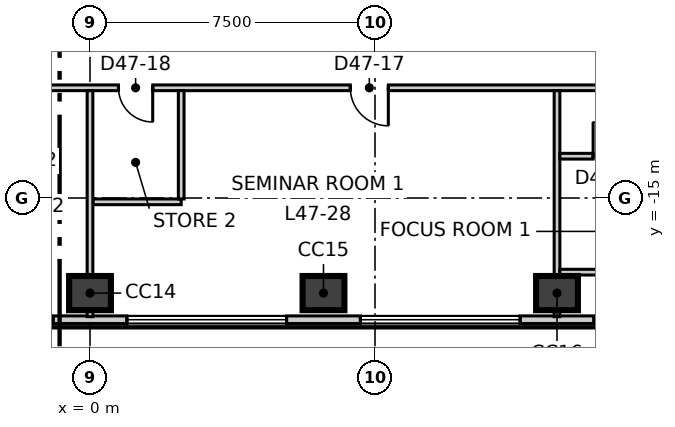
"""IFC4 building model, lengths in metres.
Left out: names, types, materials, properties, quantities, classifications, styles, units other than length and angle.
Written with IfcOpenShell. Run it as: python <this file> out.ifc"""

import sys

from ifc_helpers import new_model, si_unit, direction, frame, frame_2d, origin, origin_2d, place, context, subcontext, project, spatial, rectangle, extrude, element, fill, save


model = new_model("IFC4")
c1 = context("Model", 3, precision=1e-05, world=origin(), true_north=direction((0.0, 1.0)))
c2 = subcontext(c1, "Body", "Model", "MODEL_VIEW")
j1 = project(units=[si_unit("LENGTHUNIT", "METRE"), si_unit("PLANEANGLEUNIT", "RADIAN")], contexts=[c1])
p1 = place(None, origin())
s1 = spatial("IfcSite", under=j1, at=p1, CompositionType="ELEMENT")
p2 = place(p1, origin())
s2 = spatial("IfcBuilding", under=s1, at=p2, CompositionType="ELEMENT")
p3 = place(p2, frame((0.0, 0.0, 203.3)))
s3 = spatial("IfcBuildingStorey", under=s2, at=p3, CompositionType="ELEMENT", Elevation=203.3)
for number, where, z_axis, x_axis in (
    (1, (0.0, -17.502, -0.3), (0.0, 0.0, 1.0), (1.0, 0.0, 0.0)),
    (2, (6.144, -17.502, -0.3), (0.0, 0.0, 1.0), (1.0, 0.0, 0.0)),
    (3, (12.289, -17.502, -0.3), (0.0, 0.0, 1.0), (1.0, 0.0, 0.0)),
):
    element("IfcColumn", number, at=place(p3, frame(where, z_axis=z_axis, x_axis=x_axis)), inside=s3, PredefinedType="COLUMN", context=c2, shape_type="SweptSolid", body=[
        extrude(rectangle(XDim=1.1, YDim=0.9, at=origin_2d()), origin(), (0.0, 0.0, 1.0), 4.0),
    ])
p4 = place(p3, frame((-25.88, -18.202, 0.0), z_axis=(0.0, 0.0, 1.0), x_axis=(1.0, 0.0, 0.0)))
e4 = element("IfcWall", 4, at=p4, inside=s3, PredefinedType="ELEMENTEDWALL", context=c2, shape_type="SweptSolid", body=[
    extrude(rectangle(XDim=51.74, YDim=0.2, at=frame_2d((25.87, 0.0))), origin(), (0.0, 0.0, 1.0), 3.7),
])
p5 = place(p4, frame((2.275, 0.0, 0.9)))
e5 = element("IfcOpeningElement", 5, at=p5, cuts=e4, PredefinedType="OPENING", context=c2, shape_type="SweptSolid", body=[
    extrude(rectangle(XDim=4.2, YDim=2.5, at=frame_2d((2.1, 1.25))), frame((0.0, 0.11, 0.0), z_axis=(0.0, -1.0, 0.0), x_axis=(1.0, 0.0, 0.0)), (0.0, 0.0, 1.0), 0.22),
])
p6 = place(p4, frame((8.419, 0.0, 0.9)))
e6 = element("IfcOpeningElement", 6, at=p6, cuts=e4, PredefinedType="OPENING", context=c2, shape_type="SweptSolid", body=[
    extrude(rectangle(XDim=4.2, YDim=2.5, at=frame_2d((2.1, 1.25))), frame((0.0, 0.11, 0.0), z_axis=(0.0, -1.0, 0.0), x_axis=(1.0, 0.0, 0.0)), (0.0, 0.0, 1.0), 0.22),
])
p7 = place(p4, frame((14.564, 0.0, 0.9)))
e7 = element("IfcOpeningElement", 7, at=p7, cuts=e4, PredefinedType="OPENING", context=c2, shape_type="SweptSolid", body=[
    extrude(rectangle(XDim=4.2, YDim=2.5, at=frame_2d((2.1, 1.25))), frame((0.0, 0.11, 0.0), z_axis=(0.0, -1.0, 0.0), x_axis=(1.0, 0.0, 0.0)), (0.0, 0.0, 1.0), 0.22),
])
p8 = place(p4, frame((20.708, 0.0, 0.9)))
e8 = element("IfcOpeningElement", 8, at=p8, cuts=e4, PredefinedType="OPENING", context=c2, shape_type="SweptSolid", body=[
    extrude(rectangle(XDim=4.2, YDim=2.5, at=frame_2d((2.1, 1.25))), frame((0.0, 0.11, 0.0), z_axis=(0.0, -1.0, 0.0), x_axis=(1.0, 0.0, 0.0)), (0.0, 0.0, 1.0), 0.22),
])
p9 = place(p4, frame((26.852, 0.0, 0.9)))
e9 = element("IfcOpeningElement", 9, at=p9, cuts=e4, PredefinedType="OPENING", context=c2, shape_type="SweptSolid", body=[
    extrude(rectangle(XDim=4.2, YDim=2.5, at=frame_2d((2.1, 1.25))), frame((0.0, 0.11, 0.0), z_axis=(0.0, -1.0, 0.0), x_axis=(1.0, 0.0, 0.0)), (0.0, 0.0, 1.0), 0.22),
])
p10 = place(p4, frame((32.996, 0.0, 0.9)))
e10 = element("IfcOpeningElement", 10, at=p10, cuts=e4, PredefinedType="OPENING", context=c2, shape_type="SweptSolid", body=[
    extrude(rectangle(XDim=4.2, YDim=2.5, at=frame_2d((2.1, 1.25))), frame((0.0, 0.11, 0.0), z_axis=(0.0, -1.0, 0.0), x_axis=(1.0, 0.0, 0.0)), (0.0, 0.0, 1.0), 0.22),
])
p11 = place(p4, frame((39.141, 0.0, 0.9)))
e11 = element("IfcOpeningElement", 11, at=p11, cuts=e4, PredefinedType="OPENING", context=c2, shape_type="SweptSolid", body=[
    extrude(rectangle(XDim=4.2, YDim=2.5, at=frame_2d((2.1, 1.25))), frame((0.0, 0.11, 0.0), z_axis=(0.0, -1.0, 0.0), x_axis=(1.0, 0.0, 0.0)), (0.0, 0.0, 1.0), 0.22),
])
p12 = place(p4, frame((45.285, 0.0, 0.9)))
e12 = element("IfcOpeningElement", 12, at=p12, cuts=e4, PredefinedType="OPENING", context=c2, shape_type="SweptSolid", body=[
    extrude(rectangle(XDim=4.2, YDim=2.5, at=frame_2d((2.1, 1.25))), frame((0.0, 0.11, 0.0), z_axis=(0.0, -1.0, 0.0), x_axis=(1.0, 0.0, 0.0)), (0.0, 0.0, 1.0), 0.22),
])
p13 = place(p3, frame((28.704, -13.311, 0.0), z_axis=(0.0, 0.0, 1.0), x_axis=(-0.500010281129, 0.866019467891, 0.0)))
e13 = element("IfcWall", 13, at=p13, inside=s3, PredefinedType="ELEMENTEDWALL", context=c2, shape_type="SweptSolid", body=[
    extrude(rectangle(XDim=51.739, YDim=0.2, at=frame_2d((25.87, 0.0))), origin(), (0.0, 0.0, 1.0), 3.7),
])
p14 = place(p13, frame((2.275, 0.0, 0.9)))
e14 = element("IfcOpeningElement", 14, at=p14, cuts=e13, PredefinedType="OPENING", context=c2, shape_type="SweptSolid", body=[
    extrude(rectangle(XDim=4.2, YDim=2.5, at=frame_2d((2.1, 1.25))), frame((0.0, 0.11, 0.0), z_axis=(0.0, -1.0, 0.0), x_axis=(1.0, 0.0, 0.0)), (0.0, 0.0, 1.0), 0.22),
])
p15 = place(p13, frame((8.419, 0.0, 0.9)))
e15 = element("IfcOpeningElement", 15, at=p15, cuts=e13, PredefinedType="OPENING", context=c2, shape_type="SweptSolid", body=[
    extrude(rectangle(XDim=4.2, YDim=2.5, at=frame_2d((2.1, 1.25))), frame((0.0, 0.11, 0.0), z_axis=(0.0, -1.0, 0.0), x_axis=(1.0, 0.0, 0.0)), (0.0, 0.0, 1.0), 0.22),
])
p16 = place(p13, frame((14.563, 0.0, 0.9)))
e16 = element("IfcOpeningElement", 16, at=p16, cuts=e13, PredefinedType="OPENING", context=c2, shape_type="SweptSolid", body=[
    extrude(rectangle(XDim=4.2, YDim=2.5, at=frame_2d((2.1, 1.25))), frame((0.0, 0.11, 0.0), z_axis=(0.0, -1.0, 0.0), x_axis=(1.0, 0.0, 0.0)), (0.0, 0.0, 1.0), 0.22),
])
p17 = place(p13, frame((20.707, 0.0, 0.9)))
e17 = element("IfcOpeningElement", 17, at=p17, cuts=e13, PredefinedType="OPENING", context=c2, shape_type="SweptSolid", body=[
    extrude(rectangle(XDim=4.2, YDim=2.5, at=frame_2d((2.1, 1.25))), frame((0.0, 0.11, 0.0), z_axis=(0.0, -1.0, 0.0), x_axis=(1.0, 0.0, 0.0)), (0.0, 0.0, 1.0), 0.22),
])
p18 = place(p13, frame((26.852, 0.0, 0.9)))
e18 = element("IfcOpeningElement", 18, at=p18, cuts=e13, PredefinedType="OPENING", context=c2, shape_type="SweptSolid", body=[
    extrude(rectangle(XDim=4.2, YDim=2.5, at=frame_2d((2.1, 1.25))), frame((0.0, 0.11, 0.0), z_axis=(0.0, -1.0, 0.0), x_axis=(1.0, 0.0, 0.0)), (0.0, 0.0, 1.0), 0.22),
])
p19 = place(p13, frame((32.996, 0.0, 0.9)))
e19 = element("IfcOpeningElement", 19, at=p19, cuts=e13, PredefinedType="OPENING", context=c2, shape_type="SweptSolid", body=[
    extrude(rectangle(XDim=4.2, YDim=2.5, at=frame_2d((2.1, 1.25))), frame((0.0, 0.11, 0.0), z_axis=(0.0, -1.0, 0.0), x_axis=(1.0, 0.0, 0.0)), (0.0, 0.0, 1.0), 0.22),
])
p20 = place(p13, frame((39.14, 0.0, 0.9)))
e20 = element("IfcOpeningElement", 20, at=p20, cuts=e13, PredefinedType="OPENING", context=c2, shape_type="SweptSolid", body=[
    extrude(rectangle(XDim=4.2, YDim=2.5, at=frame_2d((2.1, 1.25))), frame((0.0, 0.11, 0.0), z_axis=(0.0, -1.0, 0.0), x_axis=(1.0, 0.0, 0.0)), (0.0, 0.0, 1.0), 0.22),
])
p21 = place(p13, frame((45.284, 0.0, 0.9)))
e21 = element("IfcOpeningElement", 21, at=p21, cuts=e13, PredefinedType="OPENING", context=c2, shape_type="SweptSolid", body=[
    extrude(rectangle(XDim=4.2, YDim=2.5, at=frame_2d((2.1, 1.25))), frame((0.0, 0.11, 0.0), z_axis=(0.0, -1.0, 0.0), x_axis=(1.0, 0.0, 0.0)), (0.0, 0.0, 1.0), 0.22),
])
p22 = place(p3, frame((-20.883, -11.97, 0.0), z_axis=(0.0, 0.0, 1.0), x_axis=(0.500006150555, 0.866021852731, 0.0)))
e22 = element("IfcWall", 22, at=p22, inside=s3, PredefinedType="PARTITIONING", context=c2, shape_type="SweptSolid", body=[
    extrude(rectangle(XDim=41.766, YDim=0.15, at=frame_2d((20.883, 0.0))), origin(), (0.0, 0.0, 1.0), 3.7),
])
p23 = place(p22, frame((36.916, 0.0, 0.0)))
e23 = element("IfcOpeningElement", 23, at=p23, cuts=e22, PredefinedType="OPENING", context=c2, shape_type="SweptSolid", body=[
    extrude(rectangle(XDim=1.1, YDim=2.1, at=frame_2d((0.55, 1.05))), frame((0.0, 0.085, 0.0), z_axis=(0.0, -1.0, 0.0), x_axis=(1.0, 0.0, 0.0)), (0.0, 0.0, 1.0), 0.17),
])
p24 = place(p22, frame((26.446, 0.0, 0.0)))
e24 = element("IfcOpeningElement", 24, at=p24, cuts=e22, PredefinedType="OPENING", context=c2, shape_type="SweptSolid", body=[
    extrude(rectangle(XDim=1.1, YDim=2.1, at=frame_2d((0.55, 1.05))), frame((0.0, 0.085, 0.0), z_axis=(0.0, -1.0, 0.0), x_axis=(1.0, 0.0, 0.0)), (0.0, 0.0, 1.0), 0.17),
])
p25 = place(p22, frame((9.757, 0.0, 0.0)))
e25 = element("IfcOpeningElement", 25, at=p25, cuts=e22, PredefinedType="OPENING", context=c2, shape_type="SweptSolid", body=[
    extrude(rectangle(XDim=1.1, YDim=2.1, at=frame_2d((0.55, 1.05))), frame((0.0, 0.085, 0.0), z_axis=(0.0, -1.0, 0.0), x_axis=(1.0, 0.0, 0.0)), (0.0, 0.0, 1.0), 0.17),
])
p26 = place(p22, frame((18.757, 0.0, 0.0)))
e26 = element("IfcOpeningElement", 26, at=p26, cuts=e22, PredefinedType="OPENING", context=c2, shape_type="SweptSolid", body=[
    extrude(rectangle(XDim=0.9, YDim=2.1, at=frame_2d((0.45, 1.05))), frame((0.0, 0.085, 0.0), z_axis=(0.0, -1.0, 0.0), x_axis=(1.0, 0.0, 0.0)), (0.0, 0.0, 1.0), 0.17),
])
p27 = place(p22, frame((15.557, 0.0, 0.0)))
e27 = element("IfcOpeningElement", 27, at=p27, cuts=e22, PredefinedType="OPENING", context=c2, shape_type="SweptSolid", body=[
    extrude(rectangle(XDim=0.9, YDim=2.1, at=frame_2d((0.45, 1.05))), frame((0.0, 0.085, 0.0), z_axis=(0.0, -1.0, 0.0), x_axis=(1.0, 0.0, 0.0)), (0.0, 0.0, 1.0), 0.17),
])
p28 = place(p22, frame((12.657, 0.0, 0.0)))
e28 = element("IfcOpeningElement", 28, at=p28, cuts=e22, PredefinedType="OPENING", context=c2, shape_type="SweptSolid", body=[
    extrude(rectangle(XDim=1.0, YDim=2.1, at=frame_2d((0.5, 1.05))), frame((0.0, 0.085, 0.0), z_axis=(0.0, -1.0, 0.0), x_axis=(1.0, 0.0, 0.0)), (0.0, 0.0, 1.0), 0.17),
])
p29 = place(p22, frame((3.669, 0.0, 0.0)))
e29 = element("IfcOpeningElement", 29, at=p29, cuts=e22, PredefinedType="OPENING", context=c2, shape_type="SweptSolid", body=[
    extrude(rectangle(XDim=1.1, YDim=2.1, at=frame_2d((0.55, 1.05))), frame((0.0, 0.085, 0.0), z_axis=(0.0, -1.0, 0.0), x_axis=(1.0, 0.0, 0.0)), (0.0, 0.0, 1.0), 0.17),
])
p30 = place(p3, frame((-20.808, -12.1, 0.0), z_axis=(0.0, 0.0, 1.0), x_axis=(1.0, 0.0, 0.0)))
e30 = element("IfcWall", 30, at=p30, inside=s3, PredefinedType="PARTITIONING", context=c2, shape_type="SweptSolid", body=[
    extrude(rectangle(XDim=41.766, YDim=0.15, at=frame_2d((20.883, 0.0))), origin(), (0.0, 0.0, 1.0), 3.7),
])
p31 = place(p30, frame((3.6, 0.0, 0.0)))
e31 = element("IfcOpeningElement", 31, at=p31, cuts=e30, PredefinedType="OPENING", context=c2, shape_type="SweptSolid", body=[
    extrude(rectangle(XDim=1.1, YDim=2.1, at=frame_2d((0.55, 1.05))), frame((0.0, 0.085, 0.0), z_axis=(0.0, -1.0, 0.0), x_axis=(1.0, 0.0, 0.0)), (0.0, 0.0, 1.0), 0.17),
])
p32 = place(p30, frame((17.07, 0.0, 0.0)))
e32 = element("IfcOpeningElement", 32, at=p32, cuts=e30, PredefinedType="OPENING", context=c2, shape_type="SweptSolid", body=[
    extrude(rectangle(XDim=1.1, YDim=2.1, at=frame_2d((0.55, 1.05))), frame((0.0, 0.085, 0.0), z_axis=(0.0, -1.0, 0.0), x_axis=(1.0, 0.0, 0.0)), (0.0, 0.0, 1.0), 0.17),
])
p33 = place(p30, frame((9.87, 0.0, 0.0)))
e33 = element("IfcOpeningElement", 33, at=p33, cuts=e30, PredefinedType="OPENING", context=c2, shape_type="SweptSolid", body=[
    extrude(rectangle(XDim=0.9, YDim=2.1, at=frame_2d((0.45, 1.05))), frame((0.0, 0.085, 0.0), z_axis=(0.0, -1.0, 0.0), x_axis=(1.0, 0.0, 0.0)), (0.0, 0.0, 1.0), 0.17),
])
p34 = place(p30, frame((12.87, 0.0, 0.0)))
e34 = element("IfcOpeningElement", 34, at=p34, cuts=e30, PredefinedType="OPENING", context=c2, shape_type="SweptSolid", body=[
    extrude(rectangle(XDim=0.9, YDim=2.1, at=frame_2d((0.45, 1.05))), frame((0.0, 0.085, 0.0), z_axis=(0.0, -1.0, 0.0), x_axis=(1.0, 0.0, 0.0)), (0.0, 0.0, 1.0), 0.17),
])
p35 = place(p30, frame((27.658, 0.0, 0.0)))
e35 = element("IfcOpeningElement", 35, at=p35, cuts=e30, PredefinedType="OPENING", context=c2, shape_type="SweptSolid", body=[
    extrude(rectangle(XDim=1.0, YDim=2.1, at=frame_2d((0.5, 1.05))), frame((0.0, 0.085, 0.0), z_axis=(0.0, -1.0, 0.0), x_axis=(1.0, 0.0, 0.0)), (0.0, 0.0, 1.0), 0.17),
])
p36 = place(p30, frame((21.558, 0.0, 0.0)))
e36 = element("IfcOpeningElement", 36, at=p36, cuts=e30, PredefinedType="OPENING", context=c2, shape_type="SweptSolid", body=[
    extrude(rectangle(XDim=0.9, YDim=2.1, at=frame_2d((0.45, 1.05))), frame((0.0, 0.085, 0.0), z_axis=(0.0, -1.0, 0.0), x_axis=(1.0, 0.0, 0.0)), (0.0, 0.0, 1.0), 0.17),
])
p37 = place(p30, frame((36.847, 0.0, 0.0)))
e37 = element("IfcOpeningElement", 37, at=p37, cuts=e30, PredefinedType="OPENING", context=c2, shape_type="SweptSolid", body=[
    extrude(rectangle(XDim=1.1, YDim=2.1, at=frame_2d((0.55, 1.05))), frame((0.0, 0.085, 0.0), z_axis=(0.0, -1.0, 0.0), x_axis=(1.0, 0.0, 0.0)), (0.0, 0.0, 1.0), 0.17),
])
p38 = place(p3, frame((0.075, -15.1, 0.0), z_axis=(0.0, 0.0, 1.0), x_axis=(1.0, 0.0, 0.0)))
e38 = element("IfcWall", 38, at=p38, inside=s3, PredefinedType="PARTITIONING", context=c2, shape_type="SweptSolid", body=[
    extrude(rectangle(XDim=2.325, YDim=0.15, at=frame_2d((1.163, 0.0))), origin(), (0.0, 0.0, 1.0), 3.7),
])
p39 = place(p3, frame((0.0, -18.122, 0.0), z_axis=(0.0, 0.0, 1.0), x_axis=(0.0, 1.0, 0.0)))
e39 = element("IfcWall", 39, at=p39, inside=s3, PredefinedType="PARTITIONING", context=c2, shape_type="SweptSolid", body=[
    extrude(rectangle(XDim=5.947, YDim=0.15, at=frame_2d((2.974, 0.0))), origin(), (0.0, 0.0, 1.0), 3.2),
])
p40 = place(p3, frame((2.4, -15.025, 0.0), z_axis=(0.0, 0.0, 1.0), x_axis=(0.0, 1.0, 0.0)))
e40 = element("IfcWall", 40, at=p40, inside=s3, PredefinedType="PARTITIONING", context=c2, shape_type="SweptSolid", body=[
    extrude(rectangle(XDim=2.85, YDim=0.15, at=frame_2d((1.425, 0.0))), origin(), (0.0, 0.0, 1.0), 3.7),
])
p41 = place(p3, frame((0.075, 24.07, 0.0), z_axis=(0.0, 0.0, 1.0), x_axis=(0.500006834213, -0.866021458014, 0.0)))
e41 = element("IfcWall", 41, at=p41, inside=s3, PredefinedType="PARTITIONING", context=c2, shape_type="SweptSolid", body=[
    extrude(rectangle(XDim=41.616, YDim=0.15, at=frame_2d((20.808, 0.0))), origin(), (0.0, 0.0, 1.0), 3.7),
])
p42 = place(p41, frame((36.915, 0.0, 0.0)))
e42 = element("IfcOpeningElement", 42, at=p42, cuts=e41, PredefinedType="OPENING", context=c2, shape_type="SweptSolid", body=[
    extrude(rectangle(XDim=1.1, YDim=2.1, at=frame_2d((0.55, 1.05))), frame((0.0, 0.085, 0.0), z_axis=(0.0, -1.0, 0.0), x_axis=(1.0, 0.0, 0.0)), (0.0, 0.0, 1.0), 0.17),
])
p43 = place(p41, frame((22.046, 0.0, 0.0)))
e43 = element("IfcOpeningElement", 43, at=p43, cuts=e41, PredefinedType="OPENING", context=c2, shape_type="SweptSolid", body=[
    extrude(rectangle(XDim=1.1, YDim=2.1, at=frame_2d((0.55, 1.05))), frame((0.0, 0.085, 0.0), z_axis=(0.0, -1.0, 0.0), x_axis=(1.0, 0.0, 0.0)), (0.0, 0.0, 1.0), 0.17),
])
p44 = place(p41, frame((31.046, 0.0, 0.0)))
e44 = element("IfcOpeningElement", 44, at=p44, cuts=e41, PredefinedType="OPENING", context=c2, shape_type="SweptSolid", body=[
    extrude(rectangle(XDim=0.9, YDim=2.1, at=frame_2d((0.45, 1.05))), frame((0.0, 0.085, 0.0), z_axis=(0.0, -1.0, 0.0), x_axis=(1.0, 0.0, 0.0)), (0.0, 0.0, 1.0), 0.17),
])
p45 = place(p41, frame((27.846, 0.0, 0.0)))
e45 = element("IfcOpeningElement", 45, at=p45, cuts=e41, PredefinedType="OPENING", context=c2, shape_type="SweptSolid", body=[
    extrude(rectangle(XDim=0.9, YDim=2.1, at=frame_2d((0.45, 1.05))), frame((0.0, 0.085, 0.0), z_axis=(0.0, -1.0, 0.0), x_axis=(1.0, 0.0, 0.0)), (0.0, 0.0, 1.0), 0.17),
])
p46 = place(p41, frame((24.946, 0.0, 0.0)))
e46 = element("IfcOpeningElement", 46, at=p46, cuts=e41, PredefinedType="OPENING", context=c2, shape_type="SweptSolid", body=[
    extrude(rectangle(XDim=1.0, YDim=2.1, at=frame_2d((0.5, 1.05))), frame((0.0, 0.085, 0.0), z_axis=(0.0, -1.0, 0.0), x_axis=(1.0, 0.0, 0.0)), (0.0, 0.0, 1.0), 0.17),
])
p47 = place(p41, frame((17.258, 0.0, 0.0)))
e47 = element("IfcOpeningElement", 47, at=p47, cuts=e41, PredefinedType="OPENING", context=c2, shape_type="SweptSolid", body=[
    extrude(rectangle(XDim=1.0, YDim=2.1, at=frame_2d((0.5, 1.05))), frame((0.0, 0.085, 0.0), z_axis=(0.0, -1.0, 0.0), x_axis=(1.0, 0.0, 0.0)), (0.0, 0.0, 1.0), 0.17),
])
p48 = place(p41, frame((11.114, 0.0, 0.0)))
e48 = element("IfcOpeningElement", 48, at=p48, cuts=e41, PredefinedType="OPENING", context=c2, shape_type="SweptSolid", body=[
    extrude(rectangle(XDim=1.0, YDim=2.1, at=frame_2d((0.5, 1.05))), frame((0.0, 0.085, 0.0), z_axis=(0.0, -1.0, 0.0), x_axis=(1.0, 0.0, 0.0)), (0.0, 0.0, 1.0), 0.17),
])
p49 = place(p41, frame((3.669, 0.0, 0.0)))
e49 = element("IfcOpeningElement", 49, at=p49, cuts=e41, PredefinedType="OPENING", context=c2, shape_type="SweptSolid", body=[
    extrude(rectangle(XDim=1.0, YDim=2.1, at=frame_2d((0.5, 1.05))), frame((0.0, 0.085, 0.0), z_axis=(0.0, -1.0, 0.0), x_axis=(1.0, 0.0, 0.0)), (0.0, 0.0, 1.0), 0.17),
])
p50 = place(p3, frame((12.289, -18.122, 0.0), z_axis=(0.0, 0.0, 1.0), x_axis=(0.0, 1.0, 0.0)))
e50 = element("IfcWall", 50, at=p50, inside=s3, PredefinedType="PARTITIONING", context=c2, shape_type="SweptSolid", body=[
    extrude(rectangle(XDim=5.947, YDim=0.15, at=frame_2d((2.974, 0.0))), origin(), (0.0, 0.0, 1.0), 3.7),
])
p51 = place(p3, frame((12.364, -13.9, 0.0), z_axis=(0.0, 0.0, 1.0), x_axis=(1.0, 0.0, 0.0)))
e51 = element("IfcWall", 51, at=p51, inside=s3, PredefinedType="PARTITIONING", context=c2, shape_type="SweptSolid", body=[
    extrude(rectangle(XDim=5.525, YDim=0.15, at=frame_2d((2.762, 0.0))), origin(), (0.0, 0.0, 1.0), 3.7),
])
p52 = place(p51, frame((0.875, 0.0, 0.0)))
e52 = element("IfcOpeningElement", 52, at=p52, cuts=e51, PredefinedType="OPENING", context=c2, shape_type="SweptSolid", body=[
    extrude(rectangle(XDim=0.9, YDim=2.1, at=frame_2d((0.45, 1.05))), frame((0.0, 0.085, 0.0), z_axis=(0.0, -1.0, 0.0), x_axis=(1.0, 0.0, 0.0)), (0.0, 0.0, 1.0), 0.17),
])
p53 = place(p3, frame((12.364, -16.951, 0.0), z_axis=(0.0, 0.0, 1.0), x_axis=(1.0, 0.0, 0.0)))
e53 = element("IfcWall", 53, at=p53, inside=s3, PredefinedType="PARTITIONING", context=c2, shape_type="SweptSolid", body=[
    extrude(rectangle(XDim=5.525, YDim=0.15, at=frame_2d((2.762, 0.0))), origin(), (0.0, 0.0, 1.0), 3.7),
])
p54 = place(p8, origin())
e54 = element("IfcWindow", 54, at=p54, inside=s3, PartitioningType="SINGLE_PANEL", PredefinedType="WINDOW", context=c2, shape_type="SweptSolid", body=[
    extrude(rectangle(XDim=4.2, YDim=2.5, at=frame_2d((2.1, 1.25))), frame((0.0, 0.03, 0.0), z_axis=(0.0, -1.0, 0.0), x_axis=(1.0, 0.0, 0.0)), (0.0, 0.0, 1.0), 0.06),
])
fill(e8, e54)
p55 = place(p9, origin())
e55 = element("IfcWindow", 55, at=p55, inside=s3, PartitioningType="SINGLE_PANEL", PredefinedType="WINDOW", context=c2, shape_type="SweptSolid", body=[
    extrude(rectangle(XDim=4.2, YDim=2.5, at=frame_2d((2.1, 1.25))), frame((0.0, 0.03, 0.0), z_axis=(0.0, -1.0, 0.0), x_axis=(1.0, 0.0, 0.0)), (0.0, 0.0, 1.0), 0.06),
])
fill(e9, e55)
p56 = place(p10, origin())
e56 = element("IfcWindow", 56, at=p56, inside=s3, PartitioningType="SINGLE_PANEL", PredefinedType="WINDOW", context=c2, shape_type="SweptSolid", body=[
    extrude(rectangle(XDim=4.2, YDim=2.5, at=frame_2d((2.1, 1.25))), frame((0.0, 0.03, 0.0), z_axis=(0.0, -1.0, 0.0), x_axis=(1.0, 0.0, 0.0)), (0.0, 0.0, 1.0), 0.06),
])
fill(e10, e56)
p57 = place(p11, origin())
e57 = element("IfcWindow", 57, at=p57, inside=s3, PartitioningType="SINGLE_PANEL", PredefinedType="WINDOW", context=c2, shape_type="SweptSolid", body=[
    extrude(rectangle(XDim=4.2, YDim=2.5, at=frame_2d((2.1, 1.25))), frame((0.0, 0.03, 0.0), z_axis=(0.0, -1.0, 0.0), x_axis=(1.0, 0.0, 0.0)), (0.0, 0.0, 1.0), 0.06),
])
fill(e11, e57)
p58 = place(p35, origin())
e58 = element("IfcDoor", 58, at=p58, inside=s3, OperationType="SINGLE_SWING_RIGHT", PredefinedType="DOOR", context=c2, shape_type="SweptSolid", body=[
    extrude(rectangle(XDim=1.0, YDim=2.1, at=frame_2d((0.5, 1.05))), frame((0.0, 0.025, 0.0), z_axis=(0.0, -1.0, 0.0), x_axis=(1.0, 0.0, 0.0)), (0.0, 0.0, 1.0), 0.05),
])
fill(e35, e58)
p59 = place(p36, origin())
e59 = element("IfcDoor", 59, at=p59, inside=s3, OperationType="SINGLE_SWING_RIGHT", PredefinedType="DOOR", context=c2, shape_type="SweptSolid", body=[
    extrude(rectangle(XDim=0.9, YDim=2.1, at=frame_2d((0.45, 1.05))), frame((0.0, 0.025, 0.0), z_axis=(0.0, -1.0, 0.0), x_axis=(1.0, 0.0, 0.0)), (0.0, 0.0, 1.0), 0.05),
])
fill(e36, e59)
p60 = place(p52, origin())
e60 = element("IfcDoor", 60, at=p60, inside=s3, OperationType="SINGLE_SWING_RIGHT", PredefinedType="DOOR", context=c2, shape_type="SweptSolid", body=[
    extrude(rectangle(XDim=0.9, YDim=2.1, at=frame_2d((0.45, 1.05))), frame((0.0, 0.025, 0.0), z_axis=(0.0, -1.0, 0.0), x_axis=(1.0, 0.0, 0.0)), (0.0, 0.0, 1.0), 0.05),
])
fill(e52, e60)
save(model, sys.argv[1])
